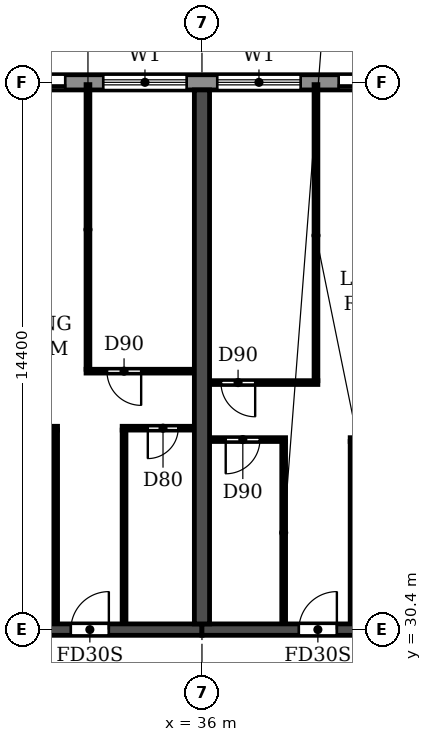
"""IFC4 building model, lengths in metres.
Left out: names, types, materials, properties, quantities, classifications, styles, units other than length and angle.
Written with IfcOpenShell. Run it as: python <this file> out.ifc"""

import sys

from ifc_helpers import new_model, si_unit, direction, frame, frame_2d, origin, place, context, subcontext, project, spatial, rectangle, extrude, element, fill, save


model = new_model("IFC4")
c1 = context("Model", 3, precision=1e-05, world=origin(), true_north=direction((0.0, 1.0)))
c2 = subcontext(c1, "Body", "Model", "MODEL_VIEW")
j1 = project(units=[si_unit("LENGTHUNIT", "METRE"), si_unit("PLANEANGLEUNIT", "RADIAN")], contexts=[c1])
p1 = place(None, origin())
s1 = spatial("IfcSite", under=j1, at=p1, CompositionType="ELEMENT")
p2 = place(p1, origin())
s2 = spatial("IfcBuilding", under=s1, at=p2, CompositionType="ELEMENT")
p3 = place(p2, frame((0.0, 0.0, 23.4)))
s3 = spatial("IfcBuildingStorey", under=s2, at=p3, CompositionType="ELEMENT", Elevation=23.4)
p4 = place(p3, frame((36.0, 30.55, 0.0), z_axis=(0.0, 0.0, 1.0), x_axis=(0.0, 1.0, 0.0)))
e1 = element("IfcWall", 1, at=p4, inside=s3, PredefinedType="SHEAR", context=c2, shape_type="SweptSolid", body=[
    extrude(rectangle(XDim=14.05, YDim=0.4, at=frame_2d((7.025, 0.0))), origin(), (0.0, 0.0, 1.0), 3.05),
])
p5 = place(p3, frame((30.0, 30.4, 0.0), z_axis=(0.0, 0.0, 1.0), x_axis=(1.0, 0.0, 0.0)))
e2 = element("IfcWall", 2, at=p5, inside=s3, PredefinedType="SHEAR", context=c2, shape_type="SweptSolid", body=[
    extrude(rectangle(XDim=6.0, YDim=0.3, at=frame_2d((3.0, 0.0))), origin(), (0.0, 0.0, 1.0), 2.45),
])
p6 = place(p5, frame((2.55, 0.0, 0.0)))
e3 = element("IfcOpeningElement", 3, at=p6, cuts=e2, PredefinedType="OPENING", context=c2, shape_type="SweptSolid", body=[
    extrude(rectangle(XDim=1.0, YDim=2.1, at=frame_2d((0.5, 1.05))), frame((0.0, 0.16, 0.0), z_axis=(0.0, -1.0, 0.0), x_axis=(1.0, 0.0, 0.0)), (0.0, 0.0, 1.0), 0.32),
])
p7 = place(p3, frame((36.0, 30.4, 0.0), z_axis=(0.0, 0.0, 1.0), x_axis=(1.0, 0.0, 0.0)))
e4 = element("IfcWall", 4, at=p7, inside=s3, PredefinedType="SHEAR", context=c2, shape_type="SweptSolid", body=[
    extrude(rectangle(XDim=6.0, YDim=0.3, at=frame_2d((3.0, 0.0))), origin(), (0.0, 0.0, 1.0), 2.45),
])
p8 = place(p7, frame((2.55, 0.0, 0.0)))
e5 = element("IfcOpeningElement", 5, at=p8, cuts=e4, PredefinedType="OPENING", context=c2, shape_type="SweptSolid", body=[
    extrude(rectangle(XDim=1.0, YDim=2.1, at=frame_2d((0.5, 1.05))), frame((0.0, 0.16, 0.0), z_axis=(0.0, -1.0, 0.0), x_axis=(1.0, 0.0, 0.0)), (0.0, 0.0, 1.0), 0.32),
])
p9 = place(p3, frame((97.317, 44.8, 0.0), z_axis=(0.0, 0.0, 1.0), x_axis=(-1.0, 0.0, 0.0)))
e6 = element("IfcWall", 6, at=p9, inside=s3, PredefinedType="STANDARD", context=c2, shape_type="SweptSolid", body=[
    extrude(rectangle(XDim=92.634, YDim=0.4, at=frame_2d((46.317, 0.0))), origin(), (0.0, 0.0, 1.0), 3.05),
])
p10 = place(p9, frame((88.717, 0.0, 0.9)))
e7 = element("IfcOpeningElement", 7, at=p10, cuts=e6, PredefinedType="OPENING", context=c2, shape_type="SweptSolid", body=[
    extrude(rectangle(XDim=2.2, YDim=1.5, at=frame_2d((1.1, 0.75))), frame((0.0, 0.21, 0.0), z_axis=(0.0, -1.0, 0.0), x_axis=(1.0, 0.0, 0.0)), (0.0, 0.0, 1.0), 0.42),
])
p11 = place(p9, frame((85.917, 0.0, 0.0)))
e8 = element("IfcOpeningElement", 8, at=p11, cuts=e6, PredefinedType="OPENING", context=c2, shape_type="SweptSolid", body=[
    extrude(rectangle(XDim=1.8, YDim=2.4, at=frame_2d((0.9, 1.2))), frame((0.0, 0.21, 0.0), z_axis=(0.0, -1.0, 0.0), x_axis=(1.0, 0.0, 0.0)), (0.0, 0.0, 1.0), 0.42),
])
p12 = place(p9, frame((82.717, 0.0, 0.9)))
e9 = element("IfcOpeningElement", 9, at=p12, cuts=e6, PredefinedType="OPENING", context=c2, shape_type="SweptSolid", body=[
    extrude(rectangle(XDim=2.2, YDim=1.5, at=frame_2d((1.1, 0.75))), frame((0.0, 0.21, 0.0), z_axis=(0.0, -1.0, 0.0), x_axis=(1.0, 0.0, 0.0)), (0.0, 0.0, 1.0), 0.42),
])
p13 = place(p9, frame((79.717, 0.0, 0.9)))
e10 = element("IfcOpeningElement", 10, at=p13, cuts=e6, PredefinedType="OPENING", context=c2, shape_type="SweptSolid", body=[
    extrude(rectangle(XDim=2.2, YDim=1.5, at=frame_2d((1.1, 0.75))), frame((0.0, 0.21, 0.0), z_axis=(0.0, -1.0, 0.0), x_axis=(1.0, 0.0, 0.0)), (0.0, 0.0, 1.0), 0.42),
])
p14 = place(p9, frame((76.917, 0.0, 0.0)))
e11 = element("IfcOpeningElement", 11, at=p14, cuts=e6, PredefinedType="OPENING", context=c2, shape_type="SweptSolid", body=[
    extrude(rectangle(XDim=1.8, YDim=2.4, at=frame_2d((0.9, 1.2))), frame((0.0, 0.21, 0.0), z_axis=(0.0, -1.0, 0.0), x_axis=(1.0, 0.0, 0.0)), (0.0, 0.0, 1.0), 0.42),
])
p15 = place(p9, frame((73.717, 0.0, 0.9)))
e12 = element("IfcOpeningElement", 12, at=p15, cuts=e6, PredefinedType="OPENING", context=c2, shape_type="SweptSolid", body=[
    extrude(rectangle(XDim=2.2, YDim=1.5, at=frame_2d((1.1, 0.75))), frame((0.0, 0.21, 0.0), z_axis=(0.0, -1.0, 0.0), x_axis=(1.0, 0.0, 0.0)), (0.0, 0.0, 1.0), 0.42),
])
p16 = place(p9, frame((70.717, 0.0, 0.9)))
e13 = element("IfcOpeningElement", 13, at=p16, cuts=e6, PredefinedType="OPENING", context=c2, shape_type="SweptSolid", body=[
    extrude(rectangle(XDim=2.2, YDim=1.5, at=frame_2d((1.1, 0.75))), frame((0.0, 0.21, 0.0), z_axis=(0.0, -1.0, 0.0), x_axis=(1.0, 0.0, 0.0)), (0.0, 0.0, 1.0), 0.42),
])
p17 = place(p9, frame((67.717, 0.0, 0.9)))
e14 = element("IfcOpeningElement", 14, at=p17, cuts=e6, PredefinedType="OPENING", context=c2, shape_type="SweptSolid", body=[
    extrude(rectangle(XDim=2.2, YDim=1.5, at=frame_2d((1.1, 0.75))), frame((0.0, 0.21, 0.0), z_axis=(0.0, -1.0, 0.0), x_axis=(1.0, 0.0, 0.0)), (0.0, 0.0, 1.0), 0.42),
])
p18 = place(p9, frame((64.917, 0.0, 0.0)))
e15 = element("IfcOpeningElement", 15, at=p18, cuts=e6, PredefinedType="OPENING", context=c2, shape_type="SweptSolid", body=[
    extrude(rectangle(XDim=1.8, YDim=2.4, at=frame_2d((0.9, 1.2))), frame((0.0, 0.21, 0.0), z_axis=(0.0, -1.0, 0.0), x_axis=(1.0, 0.0, 0.0)), (0.0, 0.0, 1.0), 0.42),
])
p19 = place(p9, frame((61.717, 0.0, 0.9)))
e16 = element("IfcOpeningElement", 16, at=p19, cuts=e6, PredefinedType="OPENING", context=c2, shape_type="SweptSolid", body=[
    extrude(rectangle(XDim=2.2, YDim=1.5, at=frame_2d((1.1, 0.75))), frame((0.0, 0.21, 0.0), z_axis=(0.0, -1.0, 0.0), x_axis=(1.0, 0.0, 0.0)), (0.0, 0.0, 1.0), 0.42),
])
p20 = place(p9, frame((58.717, 0.0, 0.9)))
e17 = element("IfcOpeningElement", 17, at=p20, cuts=e6, PredefinedType="OPENING", context=c2, shape_type="SweptSolid", body=[
    extrude(rectangle(XDim=2.2, YDim=1.5, at=frame_2d((1.1, 0.75))), frame((0.0, 0.21, 0.0), z_axis=(0.0, -1.0, 0.0), x_axis=(1.0, 0.0, 0.0)), (0.0, 0.0, 1.0), 0.42),
])
p21 = place(p9, frame((55.917, 0.0, 0.0)))
e18 = element("IfcOpeningElement", 18, at=p21, cuts=e6, PredefinedType="OPENING", context=c2, shape_type="SweptSolid", body=[
    extrude(rectangle(XDim=1.8, YDim=2.4, at=frame_2d((0.9, 1.2))), frame((0.0, 0.21, 0.0), z_axis=(0.0, -1.0, 0.0), x_axis=(1.0, 0.0, 0.0)), (0.0, 0.0, 1.0), 0.42),
])
p22 = place(p9, frame((52.917, 0.0, 0.0)))
e19 = element("IfcOpeningElement", 19, at=p22, cuts=e6, PredefinedType="OPENING", context=c2, shape_type="SweptSolid", body=[
    extrude(rectangle(XDim=1.8, YDim=2.4, at=frame_2d((0.9, 1.2))), frame((0.0, 0.21, 0.0), z_axis=(0.0, -1.0, 0.0), x_axis=(1.0, 0.0, 0.0)), (0.0, 0.0, 1.0), 0.42),
])
p23 = place(p9, frame((49.717, 0.0, 0.9)))
e20 = element("IfcOpeningElement", 20, at=p23, cuts=e6, PredefinedType="OPENING", context=c2, shape_type="SweptSolid", body=[
    extrude(rectangle(XDim=2.2, YDim=1.5, at=frame_2d((1.1, 0.75))), frame((0.0, 0.21, 0.0), z_axis=(0.0, -1.0, 0.0), x_axis=(1.0, 0.0, 0.0)), (0.0, 0.0, 1.0), 0.42),
])
p24 = place(p9, frame((46.917, 0.0, 0.0)))
e21 = element("IfcOpeningElement", 21, at=p24, cuts=e6, PredefinedType="OPENING", context=c2, shape_type="SweptSolid", body=[
    extrude(rectangle(XDim=1.8, YDim=2.4, at=frame_2d((0.9, 1.2))), frame((0.0, 0.21, 0.0), z_axis=(0.0, -1.0, 0.0), x_axis=(1.0, 0.0, 0.0)), (0.0, 0.0, 1.0), 0.42),
])
p25 = place(p9, frame((43.717, 0.0, 0.9)))
e22 = element("IfcOpeningElement", 22, at=p25, cuts=e6, PredefinedType="OPENING", context=c2, shape_type="SweptSolid", body=[
    extrude(rectangle(XDim=2.2, YDim=1.5, at=frame_2d((1.1, 0.75))), frame((0.0, 0.21, 0.0), z_axis=(0.0, -1.0, 0.0), x_axis=(1.0, 0.0, 0.0)), (0.0, 0.0, 1.0), 0.42),
])
p26 = place(p9, frame((40.717, 0.0, 0.9)))
e23 = element("IfcOpeningElement", 23, at=p26, cuts=e6, PredefinedType="OPENING", context=c2, shape_type="SweptSolid", body=[
    extrude(rectangle(XDim=2.2, YDim=1.5, at=frame_2d((1.1, 0.75))), frame((0.0, 0.21, 0.0), z_axis=(0.0, -1.0, 0.0), x_axis=(1.0, 0.0, 0.0)), (0.0, 0.0, 1.0), 0.42),
])
p27 = place(p9, frame((37.917, 0.0, 0.0)))
e24 = element("IfcOpeningElement", 24, at=p27, cuts=e6, PredefinedType="OPENING", context=c2, shape_type="SweptSolid", body=[
    extrude(rectangle(XDim=1.8, YDim=2.4, at=frame_2d((0.9, 1.2))), frame((0.0, 0.21, 0.0), z_axis=(0.0, -1.0, 0.0), x_axis=(1.0, 0.0, 0.0)), (0.0, 0.0, 1.0), 0.42),
])
p28 = place(p9, frame((34.917, 0.0, 0.0)))
e25 = element("IfcOpeningElement", 25, at=p28, cuts=e6, PredefinedType="OPENING", context=c2, shape_type="SweptSolid", body=[
    extrude(rectangle(XDim=1.8, YDim=2.4, at=frame_2d((0.9, 1.2))), frame((0.0, 0.21, 0.0), z_axis=(0.0, -1.0, 0.0), x_axis=(1.0, 0.0, 0.0)), (0.0, 0.0, 1.0), 0.42),
])
p29 = place(p9, frame((31.717, 0.0, 0.9)))
e26 = element("IfcOpeningElement", 26, at=p29, cuts=e6, PredefinedType="OPENING", context=c2, shape_type="SweptSolid", body=[
    extrude(rectangle(XDim=2.2, YDim=1.5, at=frame_2d((1.1, 0.75))), frame((0.0, 0.21, 0.0), z_axis=(0.0, -1.0, 0.0), x_axis=(1.0, 0.0, 0.0)), (0.0, 0.0, 1.0), 0.42),
])
p30 = place(p9, frame((28.717, 0.0, 0.9)))
e27 = element("IfcOpeningElement", 27, at=p30, cuts=e6, PredefinedType="OPENING", context=c2, shape_type="SweptSolid", body=[
    extrude(rectangle(XDim=2.2, YDim=1.5, at=frame_2d((1.1, 0.75))), frame((0.0, 0.21, 0.0), z_axis=(0.0, -1.0, 0.0), x_axis=(1.0, 0.0, 0.0)), (0.0, 0.0, 1.0), 0.42),
])
p31 = place(p9, frame((25.717, 0.0, 0.9)))
e28 = element("IfcOpeningElement", 28, at=p31, cuts=e6, PredefinedType="OPENING", context=c2, shape_type="SweptSolid", body=[
    extrude(rectangle(XDim=2.2, YDim=1.5, at=frame_2d((1.1, 0.75))), frame((0.0, 0.21, 0.0), z_axis=(0.0, -1.0, 0.0), x_axis=(1.0, 0.0, 0.0)), (0.0, 0.0, 1.0), 0.42),
])
p32 = place(p9, frame((22.717, 0.0, 0.9)))
e29 = element("IfcOpeningElement", 29, at=p32, cuts=e6, PredefinedType="OPENING", context=c2, shape_type="SweptSolid", body=[
    extrude(rectangle(XDim=2.2, YDim=1.5, at=frame_2d((1.1, 0.75))), frame((0.0, 0.21, 0.0), z_axis=(0.0, -1.0, 0.0), x_axis=(1.0, 0.0, 0.0)), (0.0, 0.0, 1.0), 0.42),
])
p33 = place(p9, frame((19.917, 0.0, 0.0)))
e30 = element("IfcOpeningElement", 30, at=p33, cuts=e6, PredefinedType="OPENING", context=c2, shape_type="SweptSolid", body=[
    extrude(rectangle(XDim=1.8, YDim=2.4, at=frame_2d((0.9, 1.2))), frame((0.0, 0.21, 0.0), z_axis=(0.0, -1.0, 0.0), x_axis=(1.0, 0.0, 0.0)), (0.0, 0.0, 1.0), 0.42),
])
p34 = place(p9, frame((16.717, 0.0, 0.9)))
e31 = element("IfcOpeningElement", 31, at=p34, cuts=e6, PredefinedType="OPENING", context=c2, shape_type="SweptSolid", body=[
    extrude(rectangle(XDim=2.2, YDim=1.5, at=frame_2d((1.1, 0.75))), frame((0.0, 0.21, 0.0), z_axis=(0.0, -1.0, 0.0), x_axis=(1.0, 0.0, 0.0)), (0.0, 0.0, 1.0), 0.42),
])
p35 = place(p9, frame((13.717, 0.0, 0.9)))
e32 = element("IfcOpeningElement", 32, at=p35, cuts=e6, PredefinedType="OPENING", context=c2, shape_type="SweptSolid", body=[
    extrude(rectangle(XDim=2.2, YDim=1.5, at=frame_2d((1.1, 0.75))), frame((0.0, 0.21, 0.0), z_axis=(0.0, -1.0, 0.0), x_axis=(1.0, 0.0, 0.0)), (0.0, 0.0, 1.0), 0.42),
])
p36 = place(p9, frame((10.717, 0.0, 0.9)))
e33 = element("IfcOpeningElement", 33, at=p36, cuts=e6, PredefinedType="OPENING", context=c2, shape_type="SweptSolid", body=[
    extrude(rectangle(XDim=2.2, YDim=1.5, at=frame_2d((1.1, 0.75))), frame((0.0, 0.21, 0.0), z_axis=(0.0, -1.0, 0.0), x_axis=(1.0, 0.0, 0.0)), (0.0, 0.0, 1.0), 0.42),
])
p37 = place(p9, frame((7.917, 0.0, 0.0)))
e34 = element("IfcOpeningElement", 34, at=p37, cuts=e6, PredefinedType="OPENING", context=c2, shape_type="SweptSolid", body=[
    extrude(rectangle(XDim=1.8, YDim=2.4, at=frame_2d((0.9, 1.2))), frame((0.0, 0.21, 0.0), z_axis=(0.0, -1.0, 0.0), x_axis=(1.0, 0.0, 0.0)), (0.0, 0.0, 1.0), 0.42),
])
p38 = place(p9, frame((4.917, 0.0, 0.0)))
e35 = element("IfcOpeningElement", 35, at=p38, cuts=e6, PredefinedType="OPENING", context=c2, shape_type="SweptSolid", body=[
    extrude(rectangle(XDim=1.8, YDim=2.4, at=frame_2d((0.9, 1.2))), frame((0.0, 0.21, 0.0), z_axis=(0.0, -1.0, 0.0), x_axis=(1.0, 0.0, 0.0)), (0.0, 0.0, 1.0), 0.42),
])
p39 = place(p9, frame((1.717, 0.0, 0.9)))
e36 = element("IfcOpeningElement", 36, at=p39, cuts=e6, PredefinedType="OPENING", context=c2, shape_type="SweptSolid", body=[
    extrude(rectangle(XDim=2.2, YDim=1.5, at=frame_2d((1.1, 0.75))), frame((0.0, 0.21, 0.0), z_axis=(0.0, -1.0, 0.0), x_axis=(1.0, 0.0, 0.0)), (0.0, 0.0, 1.0), 0.42),
])
p40 = place(p3, frame((36.21, 35.4, 0.0), z_axis=(0.0, 0.0, 1.0), x_axis=(1.0, 0.0, 0.0)))
e37 = element("IfcWall", 37, at=p40, inside=s3, PredefinedType="PARTITIONING", context=c2, shape_type="SweptSolid", body=[
    extrude(rectangle(XDim=1.99, YDim=0.1, at=frame_2d((0.995, 0.0))), origin(), (0.0, 0.0, 1.0), 3.05),
])
p41 = place(p40, frame((0.415, 0.0, 0.0)))
e38 = element("IfcOpeningElement", 38, at=p41, cuts=e37, PredefinedType="OPENING", context=c2, shape_type="SweptSolid", body=[
    extrude(rectangle(XDim=0.9, YDim=2.1, at=frame_2d((0.45, 1.05))), frame((0.0, 0.06, 0.0), z_axis=(0.0, -1.0, 0.0), x_axis=(1.0, 0.0, 0.0)), (0.0, 0.0, 1.0), 0.12),
])
p42 = place(p3, frame((39.9, 35.4, 0.0), z_axis=(0.0, 0.0, 1.0), x_axis=(1.0, 0.0, 0.0)))
e39 = element("IfcWall", 39, at=p42, inside=s3, PredefinedType="PARTITIONING", context=c2, shape_type="SweptSolid", body=[
    extrude(rectangle(XDim=1.89, YDim=0.1, at=frame_2d((0.945, 0.0))), origin(), (0.0, 0.0, 1.0), 3.05),
])
p43 = place(p42, frame((0.675, 0.0, 0.0)))
e40 = element("IfcOpeningElement", 40, at=p43, cuts=e39, PredefinedType="OPENING", context=c2, shape_type="SweptSolid", body=[
    extrude(rectangle(XDim=0.8, YDim=2.1, at=frame_2d((0.4, 1.05))), frame((0.0, 0.06, 0.0), z_axis=(0.0, -1.0, 0.0), x_axis=(1.0, 0.0, 0.0)), (0.0, 0.0, 1.0), 0.12),
])
p44 = place(p3, frame((30.21, 35.7, 0.0), z_axis=(0.0, 0.0, 1.0), x_axis=(1.0, 0.0, 0.0)))
e41 = element("IfcWall", 41, at=p44, inside=s3, PredefinedType="PARTITIONING", context=c2, shape_type="SweptSolid", body=[
    extrude(rectangle(XDim=1.99, YDim=0.1, at=frame_2d((0.995, 0.0))), origin(), (0.0, 0.0, 1.0), 3.05),
])
p45 = place(p44, frame((0.415, 0.0, 0.0)))
e42 = element("IfcOpeningElement", 42, at=p45, cuts=e41, PredefinedType="OPENING", context=c2, shape_type="SweptSolid", body=[
    extrude(rectangle(XDim=0.9, YDim=2.1, at=frame_2d((0.45, 1.05))), frame((0.0, 0.06, 0.0), z_axis=(0.0, -1.0, 0.0), x_axis=(1.0, 0.0, 0.0)), (0.0, 0.0, 1.0), 0.12),
])
p46 = place(p3, frame((33.9, 35.7, 0.0), z_axis=(0.0, 0.0, 1.0), x_axis=(1.0, 0.0, 0.0)))
e43 = element("IfcWall", 43, at=p46, inside=s3, PredefinedType="PARTITIONING", context=c2, shape_type="SweptSolid", body=[
    extrude(rectangle(XDim=1.89, YDim=0.1, at=frame_2d((0.945, 0.0))), origin(), (0.0, 0.0, 1.0), 3.05),
])
p47 = place(p46, frame((0.675, 0.0, 0.0)))
e44 = element("IfcOpeningElement", 44, at=p47, cuts=e43, PredefinedType="OPENING", context=c2, shape_type="SweptSolid", body=[
    extrude(rectangle(XDim=0.8, YDim=2.1, at=frame_2d((0.4, 1.05))), frame((0.0, 0.06, 0.0), z_axis=(0.0, -1.0, 0.0), x_axis=(1.0, 0.0, 0.0)), (0.0, 0.0, 1.0), 0.12),
])
p48 = place(p3, frame((36.21, 36.9, 0.0), z_axis=(0.0, 0.0, 1.0), x_axis=(1.0, 0.0, 0.0)))
e45 = element("IfcWall", 45, at=p48, inside=s3, PredefinedType="PARTITIONING", context=c2, shape_type="SweptSolid", body=[
    extrude(rectangle(XDim=2.84, YDim=0.1, at=frame_2d((1.42, 0.0))), origin(), (0.0, 0.0, 1.0), 3.05),
])
p49 = place(p48, frame((0.29, 0.0, 0.0)))
e46 = element("IfcOpeningElement", 46, at=p49, cuts=e45, PredefinedType="OPENING", context=c2, shape_type="SweptSolid", body=[
    extrude(rectangle(XDim=0.9, YDim=2.1, at=frame_2d((0.45, 1.05))), frame((0.0, 0.06, 0.0), z_axis=(0.0, -1.0, 0.0), x_axis=(1.0, 0.0, 0.0)), (0.0, 0.0, 1.0), 0.12),
])
p50 = place(p3, frame((32.95, 37.2, 0.0), z_axis=(0.0, 0.0, 1.0), x_axis=(1.0, 0.0, 0.0)))
e47 = element("IfcWall", 47, at=p50, inside=s3, PredefinedType="PARTITIONING", context=c2, shape_type="SweptSolid", body=[
    extrude(rectangle(XDim=2.84, YDim=0.1, at=frame_2d((1.42, 0.0))), origin(), (0.0, 0.0, 1.0), 3.05),
])
p51 = place(p50, frame((0.55, 0.0, 0.0)))
e48 = element("IfcOpeningElement", 48, at=p51, cuts=e47, PredefinedType="OPENING", context=c2, shape_type="SweptSolid", body=[
    extrude(rectangle(XDim=0.9, YDim=2.1, at=frame_2d((0.45, 1.05))), frame((0.0, 0.06, 0.0), z_axis=(0.0, -1.0, 0.0), x_axis=(1.0, 0.0, 0.0)), (0.0, 0.0, 1.0), 0.12),
])
p52 = place(p3, frame((32.15, 30.56, 0.0), z_axis=(0.0, 0.0, 1.0), x_axis=(0.0, 1.0, 0.0)))
e49 = element("IfcWall", 49, at=p52, inside=s3, PredefinedType="PARTITIONING", context=c2, shape_type="SweptSolid", body=[
    extrude(rectangle(XDim=5.09, YDim=0.1, at=frame_2d((2.545, 0.0))), origin(), (0.0, 0.0, 1.0), 3.05),
])
p53 = place(p3, frame((33.0, 37.25, 0.0), z_axis=(0.0, 0.0, 1.0), x_axis=(0.0, 1.0, 0.0)))
e50 = element("IfcWall", 50, at=p53, inside=s3, PredefinedType="PARTITIONING", context=c2, shape_type="SweptSolid", body=[
    extrude(rectangle(XDim=7.49, YDim=0.1, at=frame_2d((3.745, 0.0))), origin(), (0.0, 0.0, 1.0), 3.05),
])
p54 = place(p3, frame((33.95, 30.56, 0.0), z_axis=(0.0, 0.0, 1.0), x_axis=(0.0, 1.0, 0.0)))
e51 = element("IfcWall", 51, at=p54, inside=s3, PredefinedType="PARTITIONING", context=c2, shape_type="SweptSolid", body=[
    extrude(rectangle(XDim=5.09, YDim=0.1, at=frame_2d((2.545, 0.0))), origin(), (0.0, 0.0, 1.0), 3.05),
])
p55 = place(p3, frame((38.15, 30.56, 0.0), z_axis=(0.0, 0.0, 1.0), x_axis=(0.0, 1.0, 0.0)))
e52 = element("IfcWall", 52, at=p55, inside=s3, PredefinedType="PARTITIONING", context=c2, shape_type="SweptSolid", body=[
    extrude(rectangle(XDim=4.79, YDim=0.1, at=frame_2d((2.395, 0.0))), origin(), (0.0, 0.0, 1.0), 3.05),
])
p56 = place(p3, frame((39.0, 36.95, 0.0), z_axis=(0.0, 0.0, 1.0), x_axis=(0.0, 1.0, 0.0)))
e53 = element("IfcWall", 53, at=p56, inside=s3, PredefinedType="PARTITIONING", context=c2, shape_type="SweptSolid", body=[
    extrude(rectangle(XDim=7.79, YDim=0.1, at=frame_2d((3.895, 0.0))), origin(), (0.0, 0.0, 1.0), 3.05),
])
p57 = place(p3, frame((39.95, 30.56, 0.0), z_axis=(0.0, 0.0, 1.0), x_axis=(0.0, 1.0, 0.0)))
e54 = element("IfcWall", 54, at=p57, inside=s3, PredefinedType="PARTITIONING", context=c2, shape_type="SweptSolid", body=[
    extrude(rectangle(XDim=4.79, YDim=0.1, at=frame_2d((2.395, 0.0))), origin(), (0.0, 0.0, 1.0), 3.05),
])
p58 = place(p18, origin())
e55 = element("IfcDoor", 55, at=p58, inside=s3, OperationType="DOUBLE_DOOR_SLIDING", PredefinedType="DOOR", context=c2, shape_type="SweptSolid", body=[
    extrude(rectangle(XDim=1.8, YDim=2.4, at=frame_2d((0.9, 1.2))), frame((0.0, 0.025, 0.0), z_axis=(0.0, -1.0, 0.0), x_axis=(1.0, 0.0, 0.0)), (0.0, 0.0, 1.0), 0.05),
])
fill(e15, e55)
p59 = place(p19, origin())
e56 = element("IfcWindow", 56, at=p59, inside=s3, PartitioningType="DOUBLE_PANEL_HORIZONTAL", PredefinedType="WINDOW", context=c2, shape_type="SweptSolid", body=[
    extrude(rectangle(XDim=2.2, YDim=1.5, at=frame_2d((1.1, 0.75))), frame((0.0, 0.03, 0.0), z_axis=(0.0, -1.0, 0.0), x_axis=(1.0, 0.0, 0.0)), (0.0, 0.0, 1.0), 0.06),
])
fill(e16, e56)
p60 = place(p20, origin())
e57 = element("IfcWindow", 57, at=p60, inside=s3, PartitioningType="DOUBLE_PANEL_HORIZONTAL", PredefinedType="WINDOW", context=c2, shape_type="SweptSolid", body=[
    extrude(rectangle(XDim=2.2, YDim=1.5, at=frame_2d((1.1, 0.75))), frame((0.0, 0.03, 0.0), z_axis=(0.0, -1.0, 0.0), x_axis=(1.0, 0.0, 0.0)), (0.0, 0.0, 1.0), 0.06),
])
fill(e17, e57)
p61 = place(p21, origin())
e58 = element("IfcDoor", 58, at=p61, inside=s3, OperationType="DOUBLE_DOOR_SLIDING", PredefinedType="DOOR", context=c2, shape_type="SweptSolid", body=[
    extrude(rectangle(XDim=1.8, YDim=2.4, at=frame_2d((0.9, 1.2))), frame((0.0, 0.025, 0.0), z_axis=(0.0, -1.0, 0.0), x_axis=(1.0, 0.0, 0.0)), (0.0, 0.0, 1.0), 0.05),
])
fill(e18, e58)
p62 = place(p6, origin())
e59 = element("IfcDoor", 59, at=p62, inside=s3, OperationType="SINGLE_SWING_RIGHT", PredefinedType="DOOR", context=c2, shape_type="SweptSolid", body=[
    extrude(rectangle(XDim=1.0, YDim=2.1, at=frame_2d((0.5, 1.05))), frame((0.0, 0.025, 0.0), z_axis=(0.0, -1.0, 0.0), x_axis=(1.0, 0.0, 0.0)), (0.0, 0.0, 1.0), 0.05),
])
fill(e3, e59)
p63 = place(p51, frame((0.9, 0.0, 0.0), z_axis=(0.0, 0.0, 1.0), x_axis=(-1.0, 0.0, 0.0)))
e60 = element("IfcDoor", 60, at=p63, inside=s3, OperationType="SINGLE_SWING_LEFT", PredefinedType="DOOR", context=c2, shape_type="SweptSolid", body=[
    extrude(rectangle(XDim=0.9, YDim=2.1, at=frame_2d((0.45, 1.05))), frame((0.0, 0.025, 0.0), z_axis=(0.0, -1.0, 0.0), x_axis=(1.0, 0.0, 0.0)), (0.0, 0.0, 1.0), 0.05),
])
fill(e48, e60)
p64 = place(p47, frame((0.8, 0.0, 0.0), z_axis=(0.0, 0.0, 1.0), x_axis=(-1.0, 0.0, 0.0)))
e61 = element("IfcDoor", 61, at=p64, inside=s3, OperationType="SINGLE_SWING_RIGHT", PredefinedType="DOOR", context=c2, shape_type="SweptSolid", body=[
    extrude(rectangle(XDim=0.8, YDim=2.1, at=frame_2d((0.4, 1.05))), frame((0.0, 0.025, 0.0), z_axis=(0.0, -1.0, 0.0), x_axis=(1.0, 0.0, 0.0)), (0.0, 0.0, 1.0), 0.05),
])
fill(e44, e61)
p65 = place(p49, frame((0.9, 0.0, 0.0), z_axis=(0.0, 0.0, 1.0), x_axis=(-1.0, 0.0, 0.0)))
e62 = element("IfcDoor", 62, at=p65, inside=s3, OperationType="SINGLE_SWING_LEFT", PredefinedType="DOOR", context=c2, shape_type="SweptSolid", body=[
    extrude(rectangle(XDim=0.9, YDim=2.1, at=frame_2d((0.45, 1.05))), frame((0.0, 0.025, 0.0), z_axis=(0.0, -1.0, 0.0), x_axis=(1.0, 0.0, 0.0)), (0.0, 0.0, 1.0), 0.05),
])
fill(e46, e62)
p66 = place(p41, frame((0.9, 0.0, 0.0), z_axis=(0.0, 0.0, 1.0), x_axis=(-1.0, 0.0, 0.0)))
e63 = element("IfcDoor", 63, at=p66, inside=s3, OperationType="SINGLE_SWING_RIGHT", PredefinedType="DOOR", context=c2, shape_type="SweptSolid", body=[
    extrude(rectangle(XDim=0.9, YDim=2.1, at=frame_2d((0.45, 1.05))), frame((0.0, 0.025, 0.0), z_axis=(0.0, -1.0, 0.0), x_axis=(1.0, 0.0, 0.0)), (0.0, 0.0, 1.0), 0.05),
])
fill(e38, e63)
p67 = place(p8, origin())
e64 = element("IfcDoor", 64, at=p67, inside=s3, OperationType="SINGLE_SWING_RIGHT", PredefinedType="DOOR", context=c2, shape_type="SweptSolid", body=[
    extrude(rectangle(XDim=1.0, YDim=2.1, at=frame_2d((0.5, 1.05))), frame((0.0, 0.025, 0.0), z_axis=(0.0, -1.0, 0.0), x_axis=(1.0, 0.0, 0.0)), (0.0, 0.0, 1.0), 0.05),
])
fill(e5, e64)
save(model, sys.argv[1])
